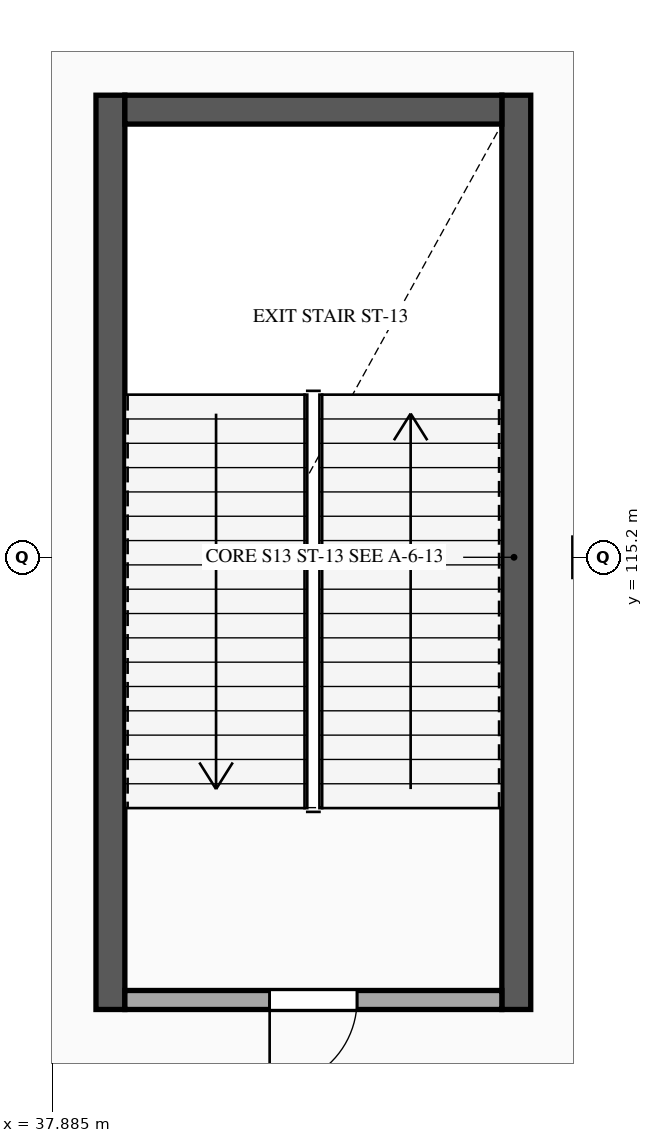
"""IFC4 building model, lengths in metres.
Left out: names, types, materials, properties, quantities, classifications, styles, units other than length and angle.
Written with IfcOpenShell. Run it as: python <this file> out.ifc"""

import sys

from ifc_helpers import new_model, si_unit, direction, frame, frame_2d, origin, origin_2d, place, context, subcontext, project, spatial, rectangle, hollow_circle, extrude, element, fill, save


model = new_model("IFC4")
c1 = context("Model", 3, precision=1e-05, world=origin(), true_north=direction((0.0, 1.0)))
c2 = subcontext(c1, "Body", "Model", "MODEL_VIEW")
j1 = project(units=[si_unit("LENGTHUNIT", "METRE"), si_unit("PLANEANGLEUNIT", "RADIAN")], contexts=[c1])
p1 = place(None, origin())
s1 = spatial("IfcSite", under=j1, at=p1, CompositionType="ELEMENT")
p2 = place(p1, origin())
s2 = spatial("IfcBuilding", under=s1, at=p2, CompositionType="ELEMENT")
p3 = place(p2, origin())
s3 = spatial("IfcBuildingStorey", under=s2, at=p3, CompositionType="ELEMENT", Elevation=0.0)
p4 = place(p3, frame((45.0, 115.2, 0.0), z_axis=(0.0, 0.0, 1.0), x_axis=(1.0, 0.0, 0.0)))
e1 = element("IfcColumn", 1, at=p4, inside=s3, PredefinedType="COLUMN", context=c2, shape_type="SweptSolid", body=[
    extrude(hollow_circle(Radius=0.254, WallThickness=0.016, at=origin_2d()), origin(), (0.0, 0.0, 1.0), 5.4),
])
for number, where, z_axis, x_axis in (
    (2, (38.65, 109.25, 0.0), (0.0, 0.0, 1.0), (0.0, 1.0, 0.0)),
    (3, (43.99, 121.28, 0.0), (0.0, 0.0, 1.0), (0.0, -1.0, 0.0)),
):
    element("IfcWall", number, at=place(p3, frame(where, z_axis=z_axis, x_axis=x_axis)), inside=s3, PredefinedType="SHEAR", context=c2, shape_type="SweptSolid", body=[
        extrude(rectangle(XDim=12.03, YDim=0.38, at=frame_2d((6.015, 0.0))), origin(), (0.0, 0.0, 1.0), 5.12),
    ])
p5 = place(p3, frame((38.84, 121.09, 0.0), z_axis=(0.0, 0.0, 1.0), x_axis=(1.0, 0.0, 0.0)))
e4 = element("IfcWall", 4, at=p5, inside=s3, PredefinedType="SHEAR", context=c2, shape_type="SweptSolid", body=[
    extrude(rectangle(XDim=4.96, YDim=0.38, at=frame_2d((2.48, 0.0))), origin(), (0.0, 0.0, 1.0), 5.12),
])
p6 = place(p3, frame((43.8, 109.375, 0.0), z_axis=(0.0, 0.0, 1.0), x_axis=(-1.0, 0.0, 0.0)))
e5 = element("IfcWall", 5, at=p6, inside=s3, PredefinedType="STANDARD", context=c2, shape_type="SweptSolid", body=[
    extrude(rectangle(XDim=4.96, YDim=0.25, at=frame_2d((2.48, 0.0))), origin(), (0.0, 0.0, 1.0), 5.08),
])
p7 = place(p6, frame((1.905, 0.0, 0.0)))
e6 = element("IfcOpeningElement", 6, at=p7, cuts=e5, PredefinedType="OPENING", context=c2, shape_type="SweptSolid", body=[
    extrude(rectangle(XDim=1.15, YDim=2.2, at=frame_2d((0.575, 1.1))), frame((0.0, 0.135, 0.0), z_axis=(0.0, -1.0, 0.0), x_axis=(1.0, 0.0, 0.0)), (0.0, 0.0, 1.0), 0.27),
])
p8 = place(p7, origin())
e7 = element("IfcDoor", 7, at=p8, inside=s3, OperationType="SINGLE_SWING_RIGHT", PredefinedType="DOOR", context=c2, shape_type="SweptSolid", body=[
    extrude(rectangle(XDim=1.15, YDim=2.2, at=frame_2d((0.575, 1.1))), frame((0.0, 0.025, 0.0), z_axis=(0.0, -1.0, 0.0), x_axis=(1.0, 0.0, 0.0)), (0.0, 0.0, 1.0), 0.05),
])
fill(e6, e7)
save(model, sys.argv[1])
